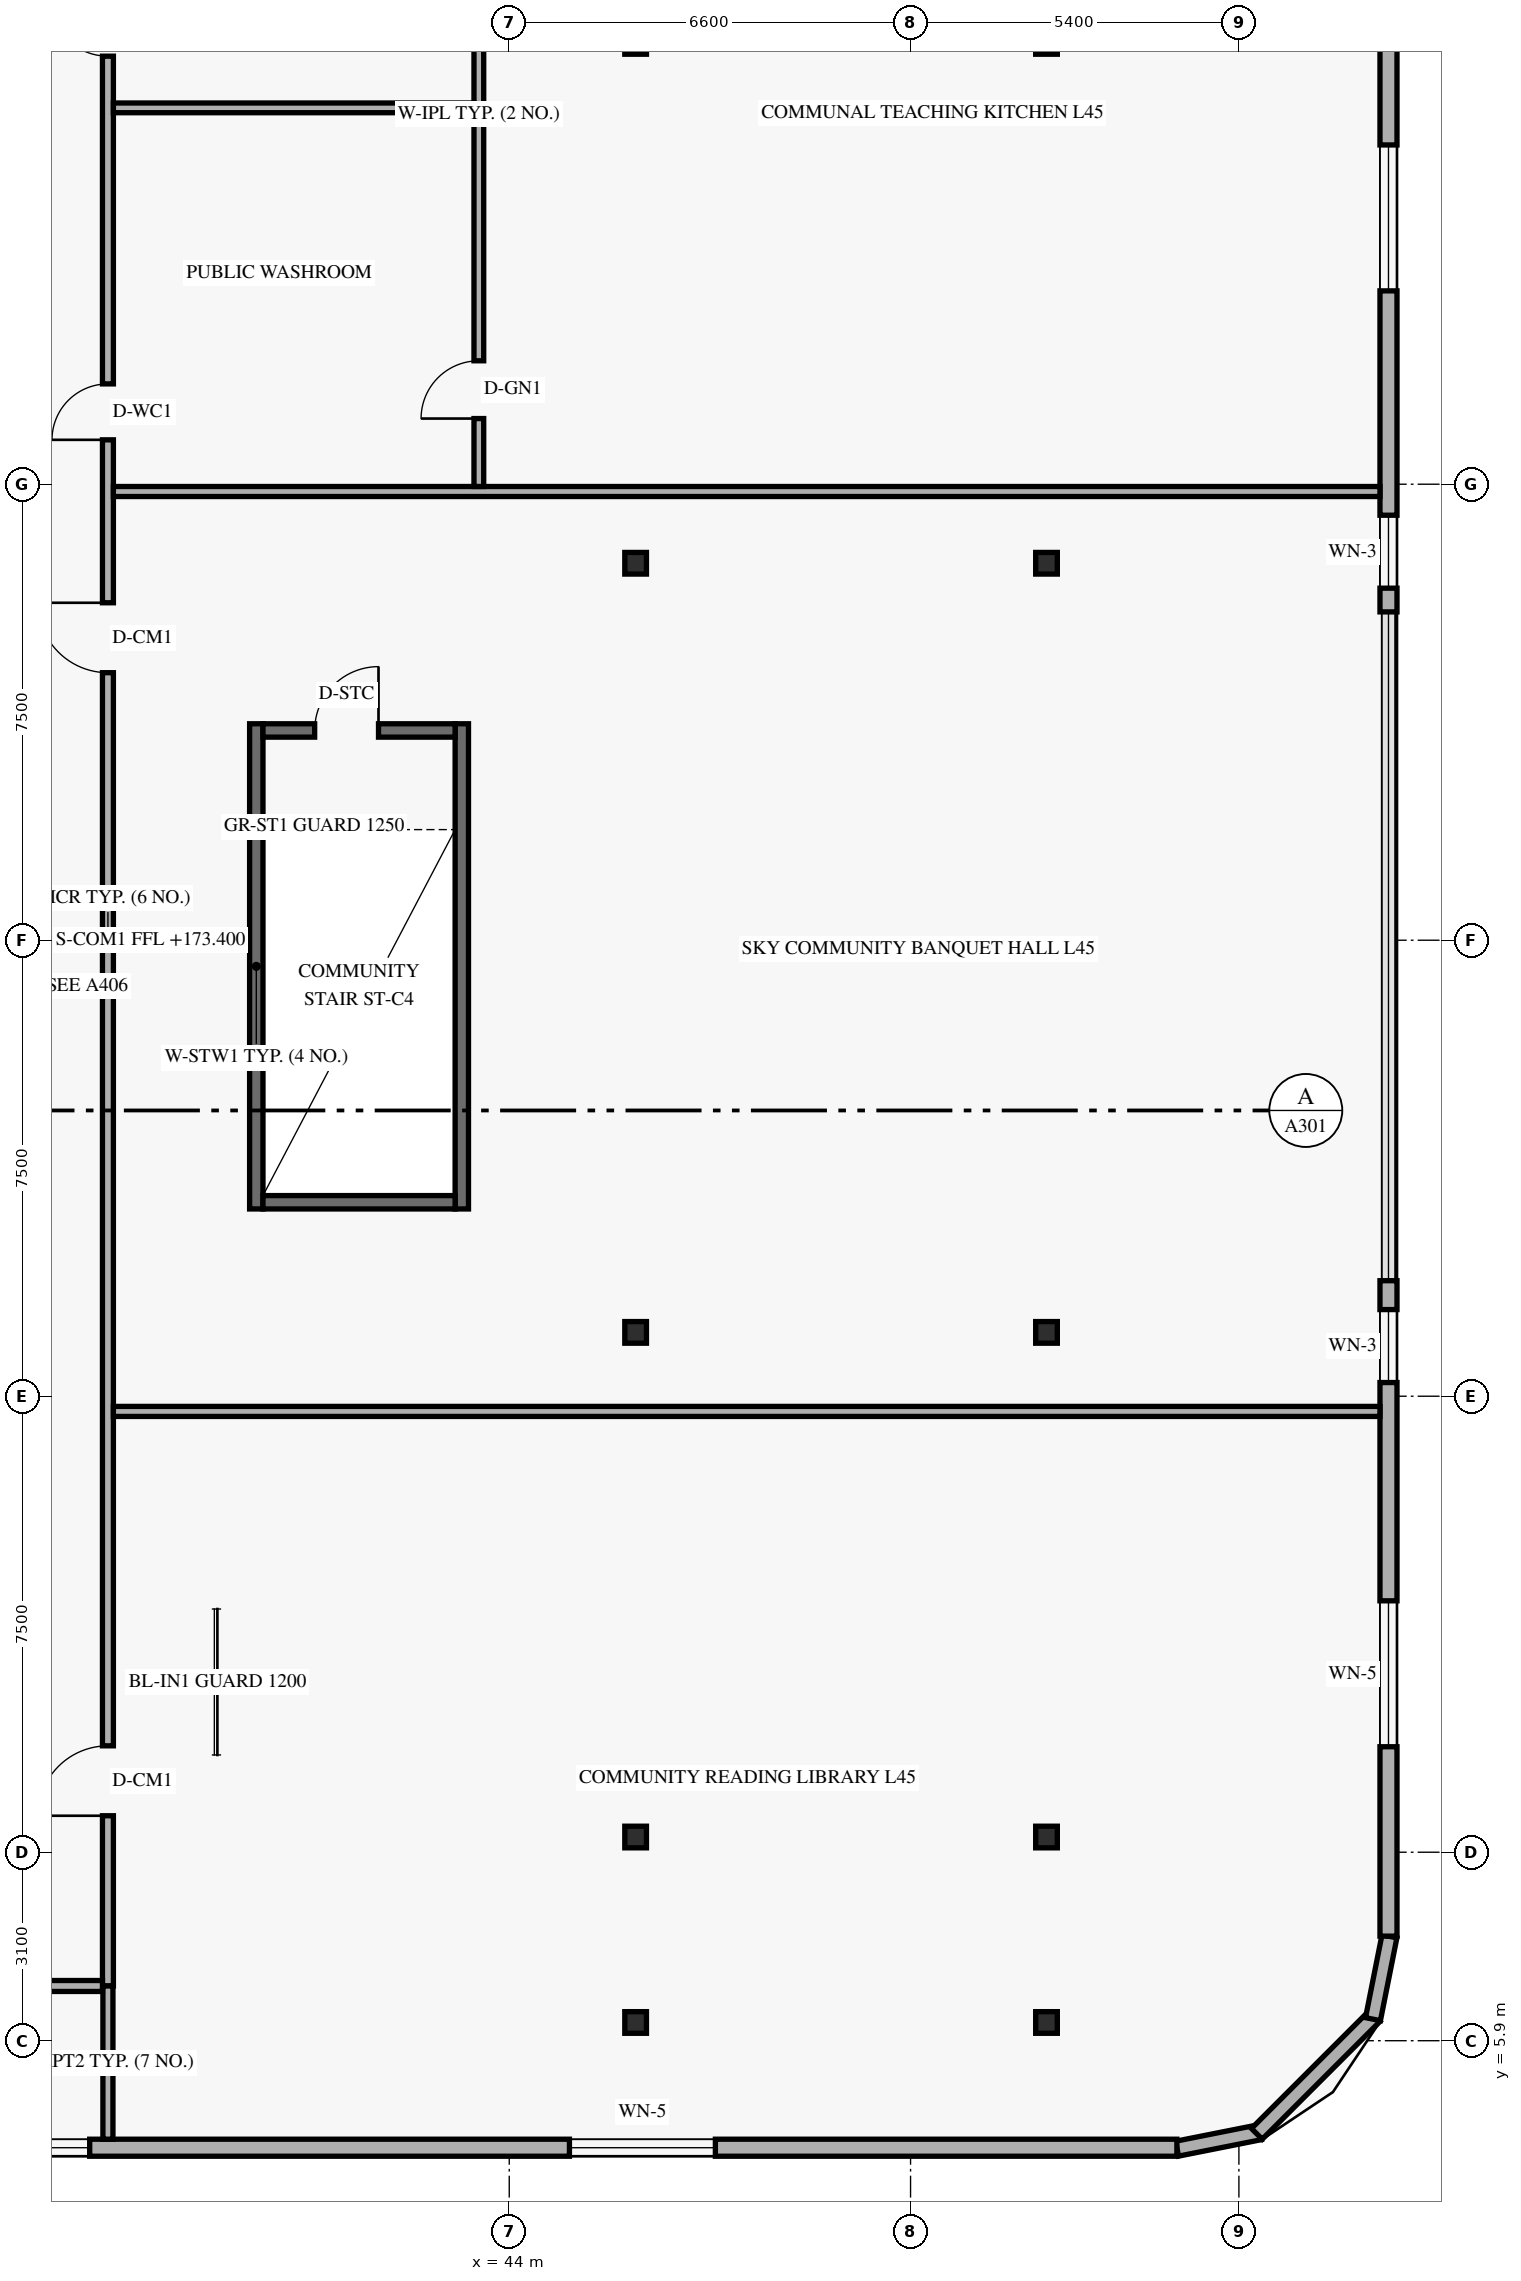
"""IFC4 building model, lengths in metres.
Left out: names, types, materials, properties, quantities, classifications, styles, units other than length and angle.
Written with IfcOpenShell. Run it as: python <this file> out.ifc"""

import sys

from ifc_helpers import new_model, si_unit, direction, frame, frame_2d, origin, origin_2d, place, context, subcontext, project, spatial, rectangle, hollow_rectangle, extrude, element, fill, save


model = new_model("IFC4")
c1 = context("Model", 3, precision=1e-05, world=origin(), true_north=direction((0.0, 1.0)))
c2 = subcontext(c1, "Body", "Model", "MODEL_VIEW")
j1 = project(units=[si_unit("LENGTHUNIT", "METRE"), si_unit("PLANEANGLEUNIT", "RADIAN")], contexts=[c1])
p1 = place(None, origin())
s1 = spatial("IfcSite", under=j1, at=p1, CompositionType="ELEMENT")
p2 = place(p1, origin())
s2 = spatial("IfcBuilding", under=s1, at=p2, CompositionType="ELEMENT")
p3 = place(p2, frame((0.0, 0.0, 173.4)))
s3 = spatial("IfcBuildingStorey", under=s2, at=p3, CompositionType="ELEMENT", Elevation=173.4)
for number, where, z_axis, x_axis in (
    (1, (39.84, 19.58, 0.0), (0.0, 0.0, 1.0), (0.0, 1.0, 0.0)),
    (2, (43.22, 19.58, 0.0), (0.0, 0.0, 1.0), (0.0, 1.0, 0.0)),
):
    element("IfcWall", number, at=place(p3, frame(where, z_axis=z_axis, x_axis=x_axis)), inside=s3, PredefinedType="SHEAR", context=c2, shape_type="SweptSolid", body=[
        extrude(rectangle(XDim=7.98, YDim=0.22, at=frame_2d((3.99, 0.0))), origin(), (0.0, 0.0, 1.0), 3.96),
    ])
p4 = place(p3, frame((39.95, 19.69, 0.0), z_axis=(0.0, 0.0, 1.0), x_axis=(1.0, 0.0, 0.0)))
e3 = element("IfcWall", 3, at=p4, inside=s3, PredefinedType="SHEAR", context=c2, shape_type="SweptSolid", body=[
    extrude(rectangle(XDim=3.16, YDim=0.22, at=frame_2d((1.58, 0.0))), origin(), (0.0, 0.0, 1.0), 3.96),
])
p5 = place(p3, frame((39.95, 27.45, 0.0), z_axis=(0.0, 0.0, 1.0), x_axis=(1.0, 0.0, 0.0)))
e4 = element("IfcWall", 4, at=p5, inside=s3, PredefinedType="SHEAR", context=c2, shape_type="SweptSolid", body=[
    extrude(rectangle(XDim=3.16, YDim=0.22, at=frame_2d((1.58, 0.0))), origin(), (0.0, 0.0, 1.0), 3.96),
])
p6 = place(p5, frame((0.85, 0.0, 0.0)))
e5 = element("IfcOpeningElement", 5, at=p6, cuts=e4, PredefinedType="OPENING", context=c2, shape_type="SweptSolid", body=[
    extrude(rectangle(XDim=1.05, YDim=2.15, at=frame_2d((0.525, 1.075))), frame((0.0, 0.12, 0.0), z_axis=(0.0, -1.0, 0.0), x_axis=(1.0, 0.0, 0.0)), (0.0, 0.0, 1.0), 0.24),
])
for number, where, z_axis, x_axis in (
    (6, (46.005, 6.2, 0.0), (0.035, 0.0, 0.999), (0.0, 1.0, 0.0)),
    (7, (46.005, 9.25, 0.0), (0.035, 0.0, 0.999), (0.0, 1.0, 0.0)),
    (8, (46.005, 17.55, 0.0), (0.035, 0.0, 0.999), (0.0, 1.0, 0.0)),
    (9, (46.005, 30.2, 0.0), (0.035, 0.0, 0.999), (0.0, 1.0, 0.0)),
    (10, (46.005, 38.75, 0.0), (0.035, 0.0, 0.999), (0.0, 1.0, 0.0)),
):
    element("IfcColumn", number, at=place(p3, frame(where, z_axis=z_axis, x_axis=x_axis)), inside=s3, PredefinedType="COLUMN", context=c2, shape_type="SweptSolid", body=[
        extrude(hollow_rectangle(XDim=0.356, YDim=0.356, WallThickness=0.016, at=origin_2d()), origin(), (0.0, 0.0, 1.0), 4.203),
    ])
for number, where, z_axis, x_axis in (
    (11, (52.714, 6.2, 0.0), (0.058, 0.0, 0.998), (0.0, 1.0, 0.0)),
    (12, (52.714, 9.25, 0.0), (0.058, 0.0, 0.998), (0.0, 1.0, 0.0)),
    (13, (52.714, 17.55, 0.0), (0.058, 0.0, 0.998), (0.0, 1.0, 0.0)),
    (14, (52.714, 30.2, 0.0), (0.058, 0.0, 0.998), (0.0, 1.0, 0.0)),
    (15, (52.714, 38.75, 0.0), (0.058, 0.0, 0.998), (0.0, 1.0, 0.0)),
):
    element("IfcColumn", number, at=place(p3, frame(where, z_axis=z_axis, x_axis=x_axis)), inside=s3, PredefinedType="COLUMN", context=c2, shape_type="SweptSolid", body=[
        extrude(hollow_rectangle(XDim=0.356, YDim=0.356, WallThickness=0.016, at=origin_2d()), origin(), (0.0, 0.0, 1.0), 4.207),
    ])
p7 = place(p3, frame((54.983, 4.124, 0.0), z_axis=(0.0, 0.0, 1.0), x_axis=(0.980809899341, 0.19496651342, 0.0)))
e16 = element("IfcWall", 16, at=p7, inside=s3, PredefinedType="SOLIDWALL", context=c2, shape_type="SweptSolid", body=[
    extrude(rectangle(XDim=1.389, YDim=0.25, at=frame_2d((0.694, 0.0))), origin(), (0.0, 0.0, 1.0), 3.96),
])
p8 = place(p3, frame((56.295, 4.368, 0.0), z_axis=(0.0, 0.0, 1.0), x_axis=(0.707106781187, 0.707106781187, 0.0)))
e17 = element("IfcWall", 17, at=p8, inside=s3, PredefinedType="SOLIDWALL", context=c2, shape_type="SweptSolid", body=[
    extrude(rectangle(XDim=2.739, YDim=0.25, at=frame_2d((1.37, 0.0))), origin(), (0.0, 0.0, 1.0), 3.96),
])
p9 = place(p3, frame((58.205, 6.254, 0.0), z_axis=(0.0, 0.0, 1.0), x_axis=(0.19496651342, 0.980809899341, 0.0)))
e18 = element("IfcWall", 18, at=p9, inside=s3, PredefinedType="SOLIDWALL", context=c2, shape_type="SweptSolid", body=[
    extrude(rectangle(XDim=1.389, YDim=0.25, at=frame_2d((0.694, 0.0))), origin(), (0.0, 0.0, 1.0), 3.96),
])
p10 = place(p3, frame((34.4, 4.14, 0.0), z_axis=(0.0, 0.0, 1.0), x_axis=(1.0, 0.0, 0.0)))
e19 = element("IfcWall", 19, at=p10, inside=s3, PredefinedType="SOLIDWALL", context=c2, shape_type="SweptSolid", body=[
    extrude(rectangle(XDim=20.58, YDim=0.28, at=frame_2d((10.29, 0.0))), origin(), (0.0, 0.0, 1.0), 3.96),
])
p11 = place(p10, frame((0.3, 0.0, 0.85)))
e20 = element("IfcOpeningElement", 20, at=p11, cuts=e19, PredefinedType="OPENING", context=c2, shape_type="SweptSolid", body=[
    extrude(rectangle(XDim=2.4, YDim=1.9, at=frame_2d((1.2, 0.95))), frame((0.0, 0.15, 0.0), z_axis=(0.0, -1.0, 0.0), x_axis=(1.0, 0.0, 0.0)), (0.0, 0.0, 1.0), 0.3),
])
p12 = place(p10, frame((10.59, 0.0, 0.85)))
e21 = element("IfcOpeningElement", 21, at=p12, cuts=e19, PredefinedType="OPENING", context=c2, shape_type="SweptSolid", body=[
    extrude(rectangle(XDim=2.4, YDim=1.9, at=frame_2d((1.2, 0.95))), frame((0.0, 0.15, 0.0), z_axis=(0.0, -1.0, 0.0), x_axis=(1.0, 0.0, 0.0)), (0.0, 0.0, 1.0), 0.3),
])
p13 = place(p3, frame((58.46, 7.62, 0.0), z_axis=(0.0, 0.0, 1.0), x_axis=(0.0, 1.0, 0.0)))
e22 = element("IfcWall", 22, at=p13, inside=s3, PredefinedType="SOLIDWALL", context=c2, shape_type="SweptSolid", body=[
    extrude(rectangle(XDim=10.78, YDim=0.28, at=frame_2d((5.39, 0.0))), origin(), (0.0, 0.0, 1.0), 3.96),
])
p14 = place(p13, frame((3.115, 0.0, 0.85)))
e23 = element("IfcOpeningElement", 23, at=p14, cuts=e22, PredefinedType="OPENING", context=c2, shape_type="SweptSolid", body=[
    extrude(rectangle(XDim=2.4, YDim=1.9, at=frame_2d((1.2, 0.95))), frame((0.0, 0.15, 0.0), z_axis=(0.0, -1.0, 0.0), x_axis=(1.0, 0.0, 0.0)), (0.0, 0.0, 1.0), 0.3),
])
p15 = place(p13, frame((9.105, 0.0, 0.85)))
e24 = element("IfcOpeningElement", 24, at=p15, cuts=e22, PredefinedType="OPENING", context=c2, shape_type="SweptSolid", body=[
    extrude(rectangle(XDim=1.2, YDim=1.5, at=frame_2d((0.6, 0.75))), frame((0.0, 0.15, 0.0), z_axis=(0.0, -1.0, 0.0), x_axis=(1.0, 0.0, 0.0)), (0.0, 0.0, 1.0), 0.3),
])
p16 = place(p3, frame((58.46, 29.4, 0.0), z_axis=(0.0, 0.0, 1.0), x_axis=(0.0, 1.0, 0.0)))
e25 = element("IfcWall", 25, at=p16, inside=s3, PredefinedType="SOLIDWALL", context=c2, shape_type="SweptSolid", body=[
    extrude(rectangle(XDim=10.98, YDim=0.28, at=frame_2d((5.49, 0.0))), origin(), (0.0, 0.0, 1.0), 3.96),
])
p17 = place(p16, frame((0.39, 0.0, 0.85)))
e26 = element("IfcOpeningElement", 26, at=p17, cuts=e25, PredefinedType="OPENING", context=c2, shape_type="SweptSolid", body=[
    extrude(rectangle(XDim=1.2, YDim=1.5, at=frame_2d((0.6, 0.75))), frame((0.0, 0.15, 0.0), z_axis=(0.0, -1.0, 0.0), x_axis=(1.0, 0.0, 0.0)), (0.0, 0.0, 1.0), 0.3),
])
p18 = place(p16, frame((5.28, 0.0, 0.85)))
e27 = element("IfcOpeningElement", 27, at=p18, cuts=e25, PredefinedType="OPENING", context=c2, shape_type="SweptSolid", body=[
    extrude(rectangle(XDim=2.4, YDim=1.9, at=frame_2d((1.2, 0.95))), frame((0.0, 0.15, 0.0), z_axis=(0.0, -1.0, 0.0), x_axis=(1.0, 0.0, 0.0)), (0.0, 0.0, 1.0), 0.3),
])
p19 = place(p3, frame((37.4, 6.8, 0.0), z_axis=(0.0, 0.0, 1.0), x_axis=(0.0, 1.0, 0.0)))
e28 = element("IfcWall", 28, at=p19, inside=s3, PredefinedType="STANDARD", context=c2, shape_type="SweptSolid", body=[
    extrude(rectangle(XDim=34.4, YDim=0.18, at=frame_2d((17.2, 0.0))), origin(), (0.0, 0.0, 1.0), 3.33),
])
p20 = place(p19, frame((25.43, 0.0, 0.0)))
e29 = element("IfcOpeningElement", 29, at=p20, cuts=e28, PredefinedType="OPENING", context=c2, shape_type="SweptSolid", body=[
    extrude(rectangle(XDim=0.92, YDim=2.14, at=frame_2d((0.46, 1.07))), frame((0.0, 0.1, 0.0), z_axis=(0.0, -1.0, 0.0), x_axis=(1.0, 0.0, 0.0)), (0.0, 0.0, 1.0), 0.2),
])
p21 = place(p19, frame((31.74, 0.0, 0.0)))
e30 = element("IfcOpeningElement", 30, at=p21, cuts=e28, PredefinedType="OPENING", context=c2, shape_type="SweptSolid", body=[
    extrude(rectangle(XDim=0.95, YDim=2.14, at=frame_2d((0.475, 1.07))), frame((0.0, 0.1, 0.0), z_axis=(0.0, -1.0, 0.0), x_axis=(1.0, 0.0, 0.0)), (0.0, 0.0, 1.0), 0.2),
])
p22 = place(p19, frame((2.8, 0.0, 0.0)))
e31 = element("IfcOpeningElement", 31, at=p22, cuts=e28, PredefinedType="OPENING", context=c2, shape_type="SweptSolid", body=[
    extrude(rectangle(XDim=1.15, YDim=2.15, at=frame_2d((0.575, 1.075))), frame((0.0, 0.1, 0.0), z_axis=(0.0, -1.0, 0.0), x_axis=(1.0, 0.0, 0.0)), (0.0, 0.0, 1.0), 0.2),
])
p23 = place(p19, frame((21.6, 0.0, 0.0)))
e32 = element("IfcOpeningElement", 32, at=p23, cuts=e28, PredefinedType="OPENING", context=c2, shape_type="SweptSolid", body=[
    extrude(rectangle(XDim=1.15, YDim=2.15, at=frame_2d((0.575, 1.075))), frame((0.0, 0.1, 0.0), z_axis=(0.0, -1.0, 0.0), x_axis=(1.0, 0.0, 0.0)), (0.0, 0.0, 1.0), 0.2),
])
p24 = place(p3, frame((37.4, 4.28, 0.0), z_axis=(0.0, 0.0, 1.0), x_axis=(0.0, 1.0, 0.0)))
e33 = element("IfcWall", 33, at=p24, inside=s3, PredefinedType="PARTITIONING", context=c2, shape_type="SweptSolid", body=[
    extrude(rectangle(XDim=2.52, YDim=0.165, at=frame_2d((1.26, 0.0))), origin(), (0.0, 0.0, 1.0), 3.479),
])
for number, where, z_axis, x_axis in (
    (34, (37.49, 16.25, 0.0), (0.0, 0.0, 1.0), (1.0, 0.0, 0.0)),
    (35, (37.49, 31.38, 0.0), (0.0, 0.0, 1.0), (1.0, 0.0, 0.0)),
):
    element("IfcWall", number, at=place(p3, frame(where, z_axis=z_axis, x_axis=x_axis)), inside=s3, PredefinedType="PARTITIONING", context=c2, shape_type="SweptSolid", body=[
        extrude(rectangle(XDim=20.83, YDim=0.165, at=frame_2d((10.415, 0.0))), origin(), (0.0, 0.0, 1.0), 3.33),
    ])
p25 = place(p3, frame((43.5, 31.462, 0.0), z_axis=(0.0, 0.0, 1.0), x_axis=(0.0, 1.0, 0.0)))
e36 = element("IfcWall", 36, at=p25, inside=s3, PredefinedType="PLUMBINGWALL", context=c2, shape_type="SweptSolid", body=[
    extrude(rectangle(XDim=12.258, YDim=0.16, at=frame_2d((6.129, 0.0))), origin(), (0.0, 0.0, 1.0), 3.33),
])
p26 = place(p25, frame((1.117, 0.0, 0.0)))
e37 = element("IfcOpeningElement", 37, at=p26, cuts=e36, PredefinedType="OPENING", context=c2, shape_type="SweptSolid", body=[
    extrude(rectangle(XDim=0.95, YDim=2.15, at=frame_2d((0.475, 1.075))), frame((0.0, 0.09, 0.0), z_axis=(0.0, -1.0, 0.0), x_axis=(1.0, 0.0, 0.0)), (0.0, 0.0, 1.0), 0.18),
])
p27 = place(p3, frame((37.49, 37.69, 0.0), z_axis=(0.0, 0.0, 1.0), x_axis=(1.0, 0.0, 0.0)))
e38 = element("IfcWall", 38, at=p27, inside=s3, PredefinedType="PLUMBINGWALL", context=c2, shape_type="SweptSolid", body=[
    extrude(rectangle(XDim=5.93, YDim=0.16, at=frame_2d((2.965, 0.0))), origin(), (0.0, 0.0, 1.0), 3.96),
])
p28 = place(p3, frame((21.74, 6.8, 0.0), z_axis=(0.0, 0.0, 1.0), x_axis=(1.0, 0.0, 0.0)))
e39 = element("IfcWall", 39, at=p28, inside=s3, PredefinedType="STANDARD", context=c2, shape_type="SweptSolid", body=[
    extrude(rectangle(XDim=15.57, YDim=0.18, at=frame_2d((7.785, 0.0))), origin(), (0.0, 0.0, 1.0), 3.33),
])
p29 = place(p28, frame((5.41, 0.0, 0.0)))
e40 = element("IfcOpeningElement", 40, at=p29, cuts=e39, PredefinedType="OPENING", context=c2, shape_type="SweptSolid", body=[
    extrude(rectangle(XDim=0.95, YDim=2.15, at=frame_2d((0.475, 1.075))), frame((0.0, 0.1, 0.0), z_axis=(0.0, -1.0, 0.0), x_axis=(1.0, 0.0, 0.0)), (0.0, 0.0, 1.0), 0.2),
])
p30 = place(p11, origin())
e41 = element("IfcWindow", 41, at=p30, inside=s3, PartitioningType="SINGLE_PANEL", PredefinedType="WINDOW", context=c2, shape_type="SweptSolid", body=[
    extrude(rectangle(XDim=2.4, YDim=1.9, at=frame_2d((1.2, 0.95))), frame((0.0, 0.03, 0.0), z_axis=(0.0, -1.0, 0.0), x_axis=(1.0, 0.0, 0.0)), (0.0, 0.0, 1.0), 0.06),
])
fill(e20, e41)
p31 = place(p12, origin())
e42 = element("IfcWindow", 42, at=p31, inside=s3, PartitioningType="SINGLE_PANEL", PredefinedType="WINDOW", context=c2, shape_type="SweptSolid", body=[
    extrude(rectangle(XDim=2.4, YDim=1.9, at=frame_2d((1.2, 0.95))), frame((0.0, 0.03, 0.0), z_axis=(0.0, -1.0, 0.0), x_axis=(1.0, 0.0, 0.0)), (0.0, 0.0, 1.0), 0.06),
])
fill(e21, e42)
p32 = place(p14, origin())
e43 = element("IfcWindow", 43, at=p32, inside=s3, PartitioningType="SINGLE_PANEL", PredefinedType="WINDOW", context=c2, shape_type="SweptSolid", body=[
    extrude(rectangle(XDim=2.4, YDim=1.9, at=frame_2d((1.2, 0.95))), frame((0.0, 0.03, 0.0), z_axis=(0.0, -1.0, 0.0), x_axis=(1.0, 0.0, 0.0)), (0.0, 0.0, 1.0), 0.06),
])
fill(e23, e43)
p33 = place(p15, origin())
e44 = element("IfcWindow", 44, at=p33, inside=s3, PartitioningType="SINGLE_PANEL", PredefinedType="WINDOW", context=c2, shape_type="SweptSolid", body=[
    extrude(rectangle(XDim=1.2, YDim=1.5, at=frame_2d((0.6, 0.75))), frame((0.0, 0.03, 0.0), z_axis=(0.0, -1.0, 0.0), x_axis=(1.0, 0.0, 0.0)), (0.0, 0.0, 1.0), 0.06),
])
fill(e24, e44)
p34 = place(p17, origin())
e45 = element("IfcWindow", 45, at=p34, inside=s3, PartitioningType="SINGLE_PANEL", PredefinedType="WINDOW", context=c2, shape_type="SweptSolid", body=[
    extrude(rectangle(XDim=1.2, YDim=1.5, at=frame_2d((0.6, 0.75))), frame((0.0, 0.03, 0.0), z_axis=(0.0, -1.0, 0.0), x_axis=(1.0, 0.0, 0.0)), (0.0, 0.0, 1.0), 0.06),
])
fill(e26, e45)
p35 = place(p18, origin())
e46 = element("IfcWindow", 46, at=p35, inside=s3, PartitioningType="SINGLE_PANEL", PredefinedType="WINDOW", context=c2, shape_type="SweptSolid", body=[
    extrude(rectangle(XDim=2.4, YDim=1.9, at=frame_2d((1.2, 0.95))), frame((0.0, 0.03, 0.0), z_axis=(0.0, -1.0, 0.0), x_axis=(1.0, 0.0, 0.0)), (0.0, 0.0, 1.0), 0.06),
])
fill(e27, e46)
p36 = place(p6, frame((1.05, 0.0, 0.0), z_axis=(0.0, 0.0, 1.0), x_axis=(-1.0, 0.0, 0.0)))
e47 = element("IfcDoor", 47, at=p36, inside=s3, OperationType="SINGLE_SWING_LEFT", PredefinedType="DOOR", context=c2, shape_type="SweptSolid", body=[
    extrude(rectangle(XDim=1.05, YDim=2.15, at=frame_2d((0.525, 1.075))), frame((0.0, 0.025, 0.0), z_axis=(0.0, -1.0, 0.0), x_axis=(1.0, 0.0, 0.0)), (0.0, 0.0, 1.0), 0.05),
])
fill(e5, e47)
p37 = place(p20, origin())
e48 = element("IfcDoor", 48, at=p37, inside=s3, OperationType="SINGLE_SWING_LEFT", PredefinedType="DOOR", context=c2, shape_type="SweptSolid", body=[
    extrude(rectangle(XDim=0.92, YDim=2.14, at=frame_2d((0.46, 1.07))), frame((0.0, 0.025, 0.0), z_axis=(0.0, -1.0, 0.0), x_axis=(1.0, 0.0, 0.0)), (0.0, 0.0, 1.0), 0.05),
])
fill(e29, e48)
p38 = place(p21, origin())
e49 = element("IfcDoor", 49, at=p38, inside=s3, OperationType="SINGLE_SWING_RIGHT", PredefinedType="DOOR", context=c2, shape_type="SweptSolid", body=[
    extrude(rectangle(XDim=0.95, YDim=2.14, at=frame_2d((0.475, 1.07))), frame((0.0, 0.025, 0.0), z_axis=(0.0, -1.0, 0.0), x_axis=(1.0, 0.0, 0.0)), (0.0, 0.0, 1.0), 0.05),
])
fill(e30, e49)
p39 = place(p26, origin())
e50 = element("IfcDoor", 50, at=p39, inside=s3, OperationType="SINGLE_SWING_LEFT", PredefinedType="DOOR", context=c2, shape_type="SweptSolid", body=[
    extrude(rectangle(XDim=0.95, YDim=2.15, at=frame_2d((0.475, 1.075))), frame((0.0, 0.025, 0.0), z_axis=(0.0, -1.0, 0.0), x_axis=(1.0, 0.0, 0.0)), (0.0, 0.0, 1.0), 0.05),
])
fill(e37, e50)
p40 = place(p22, origin())
e51 = element("IfcDoor", 51, at=p40, inside=s3, OperationType="SINGLE_SWING_LEFT", PredefinedType="DOOR", context=c2, shape_type="SweptSolid", body=[
    extrude(rectangle(XDim=1.15, YDim=2.15, at=frame_2d((0.575, 1.075))), frame((0.0, 0.025, 0.0), z_axis=(0.0, -1.0, 0.0), x_axis=(1.0, 0.0, 0.0)), (0.0, 0.0, 1.0), 0.05),
])
fill(e31, e51)
p41 = place(p23, origin())
e52 = element("IfcDoor", 52, at=p41, inside=s3, OperationType="SINGLE_SWING_RIGHT", PredefinedType="DOOR", context=c2, shape_type="SweptSolid", body=[
    extrude(rectangle(XDim=1.15, YDim=2.15, at=frame_2d((0.575, 1.075))), frame((0.0, 0.025, 0.0), z_axis=(0.0, -1.0, 0.0), x_axis=(1.0, 0.0, 0.0)), (0.0, 0.0, 1.0), 0.05),
])
fill(e32, e52)
save(model, sys.argv[1])
